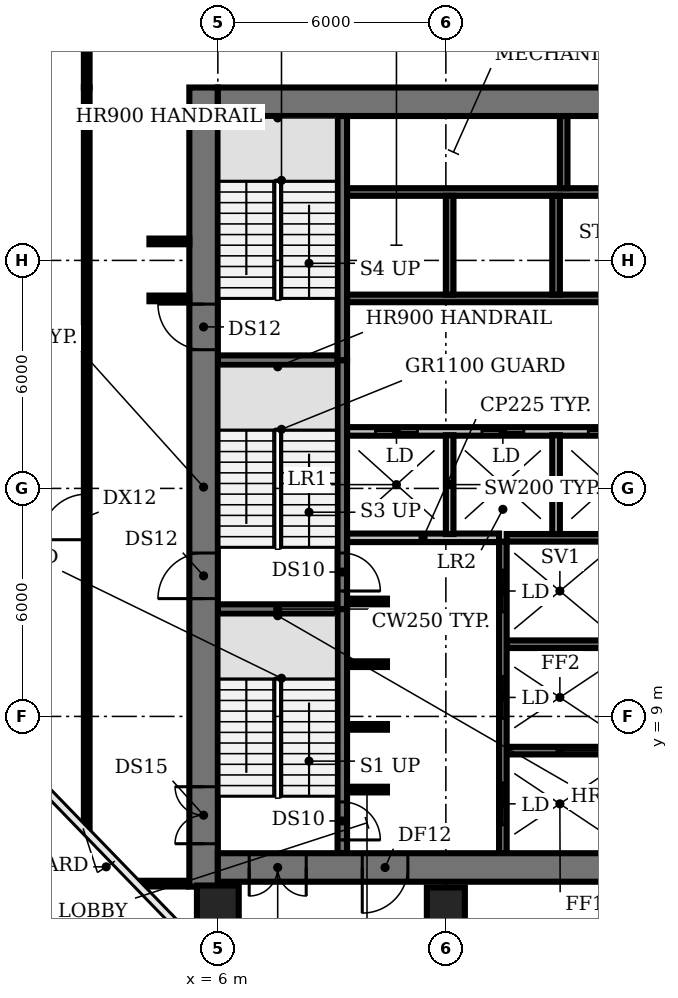
"""IFC4 building model, lengths in metres.
Left out: names, types, materials, properties, quantities, classifications, styles, units other than length and angle.
Written with IfcOpenShell. Run it as: python <this file> out.ifc"""

import sys

from ifc_helpers import new_model, si_unit, direction, frame, frame_2d, origin, origin_2d, place, context, subcontext, project, spatial, rectangle, circle, extrude, element, fill, save


model = new_model("IFC4")
c1 = context("Model", 3, precision=1e-05, world=origin(), true_north=direction((0.0, 1.0)))
c2 = subcontext(c1, "Body", "Model", "MODEL_VIEW")
j1 = project(units=[si_unit("LENGTHUNIT", "METRE"), si_unit("PLANEANGLEUNIT", "RADIAN")], contexts=[c1])
p1 = place(None, origin())
s1 = spatial("IfcSite", under=j1, at=p1, CompositionType="ELEMENT")
p2 = place(p1, origin())
s2 = spatial("IfcBuilding", under=s1, at=p2, CompositionType="ELEMENT")
p3 = place(p2, frame((0.0, 0.0, 134.0)))
s3 = spatial("IfcBuildingStorey", under=s2, at=p3, CompositionType="ELEMENT", Elevation=134.0)
p4 = place(p3, frame((6.0, 4.0, 0.0), z_axis=(0.0, 0.0, 1.0), x_axis=(1.0, 0.0, 0.0)))
e1 = element("IfcColumn", 1, at=p4, inside=s3, PredefinedType="COLUMN", context=c2, shape_type="SweptSolid", body=[
    extrude(circle(Radius=0.55, at=origin_2d()), origin(), (0.0, 0.0, 1.0), 3.2),
])
p5 = place(p3, frame((12.0, 4.0, 0.0), z_axis=(0.0, 0.0, 1.0), x_axis=(1.0, 0.0, 0.0)))
e2 = element("IfcColumn", 2, at=p5, inside=s3, PredefinedType="COLUMN", context=c2, shape_type="SweptSolid", body=[
    extrude(rectangle(XDim=1.0, YDim=1.0, at=origin_2d()), origin(), (0.0, 0.0, 1.0), 3.2),
])
p6 = place(p3, frame((9.4, 7.075, 0.0), z_axis=(0.0, 0.0, 1.0), x_axis=(1.0, 0.0, 0.0)))
e3 = element("IfcWall", 3, at=p6, inside=s3, PredefinedType="SHEAR", context=c2, shape_type="SweptSolid", body=[
    extrude(rectangle(XDim=1.05, YDim=0.15, at=frame_2d((0.525, 0.0))), origin(), (0.0, 0.0, 1.0), 3.8),
])
p7 = place(p3, frame((13.6, 8.1, 0.0), z_axis=(0.0, 0.0, 1.0), x_axis=(1.0, 0.0, 0.0)))
e4 = element("IfcWall", 4, at=p7, inside=s3, PredefinedType="SHEAR", context=c2, shape_type="SweptSolid", body=[
    extrude(rectangle(XDim=2.8, YDim=0.2, at=frame_2d((1.4, 0.0))), origin(), (0.0, 0.0, 1.0), 3.8),
])
for number, where, z_axis, x_axis in (
    (5, (9.4, 8.725, 0.0), (0.0, 0.0, 1.0), (1.0, 0.0, 0.0)),
    (6, (9.4, 10.375, 0.0), (0.0, 0.0, 1.0), (1.0, 0.0, 0.0)),
):
    element("IfcWall", number, at=place(p3, frame(where, z_axis=z_axis, x_axis=x_axis)), inside=s3, PredefinedType="SHEAR", context=c2, shape_type="SweptSolid", body=[
        extrude(rectangle(XDim=1.05, YDim=0.15, at=frame_2d((0.525, 0.0))), origin(), (0.0, 0.0, 1.0), 3.8),
    ])
p8 = place(p3, frame((13.6, 10.9, 0.0), z_axis=(0.0, 0.0, 1.0), x_axis=(1.0, 0.0, 0.0)))
e7 = element("IfcWall", 7, at=p8, inside=s3, PredefinedType="SHEAR", context=c2, shape_type="SweptSolid", body=[
    extrude(rectangle(XDim=2.8, YDim=0.2, at=frame_2d((1.4, 0.0))), origin(), (0.0, 0.0, 1.0), 3.8),
])
p9 = place(p3, frame((6.0, 11.825, 0.0), z_axis=(0.0, 0.0, 1.0), x_axis=(1.0, 0.0, 0.0)))
e8 = element("IfcWall", 8, at=p9, inside=s3, PredefinedType="SHEAR", context=c2, shape_type="SweptSolid", body=[
    extrude(rectangle(XDim=3.15, YDim=0.25, at=frame_2d((1.575, 0.0))), origin(), (0.0, 0.0, 1.0), 3.8),
])
p10 = place(p3, frame((9.4, 12.025, 0.0), z_axis=(0.0, 0.0, 1.0), x_axis=(1.0, 0.0, 0.0)))
e9 = element("IfcWall", 9, at=p10, inside=s3, PredefinedType="SHEAR", context=c2, shape_type="SweptSolid", body=[
    extrude(rectangle(XDim=1.05, YDim=0.15, at=frame_2d((0.525, 0.0))), origin(), (0.0, 0.0, 1.0), 3.8),
])
p11 = place(p3, frame((9.4, 13.7, 0.0), z_axis=(0.0, 0.0, 1.0), x_axis=(1.0, 0.0, 0.0)))
e10 = element("IfcWall", 10, at=p11, inside=s3, PredefinedType="PARTITIONING", context=c2, shape_type="SweptSolid", body=[
    extrude(rectangle(XDim=4.0, YDim=0.225, at=frame_2d((2.0, 0.0))), origin(), (0.0, 0.0, 1.0), 3.8),
])
p12 = place(p3, frame((13.6, 13.7, 0.0), z_axis=(0.0, 0.0, 1.0), x_axis=(1.0, 0.0, 0.0)))
e11 = element("IfcWall", 11, at=p12, inside=s3, PredefinedType="SHEAR", context=c2, shape_type="SweptSolid", body=[
    extrude(rectangle(XDim=2.8, YDim=0.2, at=frame_2d((1.4, 0.0))), origin(), (0.0, 0.0, 1.0), 3.8),
])
p13 = place(p3, frame((9.4, 16.5, 0.0), z_axis=(0.0, 0.0, 1.0), x_axis=(1.0, 0.0, 0.0)))
e12 = element("IfcWall", 12, at=p13, inside=s3, PredefinedType="PARTITIONING", context=c2, shape_type="SweptSolid", body=[
    extrude(rectangle(XDim=14.6, YDim=0.225, at=frame_2d((7.3, 0.0))), origin(), (0.0, 0.0, 1.0), 3.8),
])
p14 = place(p13, frame((0.75, 0.0, 0.0)))
e13 = element("IfcOpeningElement", 13, at=p14, cuts=e12, PredefinedType="OPENING", context=c2, shape_type="SweptSolid", body=[
    extrude(rectangle(XDim=1.1, YDim=2.1, at=frame_2d((0.55, 1.05))), frame((0.0, 0.123, 0.0), z_axis=(0.0, -1.0, 0.0), x_axis=(1.0, 0.0, 0.0)), (0.0, 0.0, 1.0), 0.245),
])
p15 = place(p13, frame((3.55, 0.0, 0.0)))
e14 = element("IfcOpeningElement", 14, at=p15, cuts=e12, PredefinedType="OPENING", context=c2, shape_type="SweptSolid", body=[
    extrude(rectangle(XDim=1.1, YDim=2.1, at=frame_2d((0.55, 1.05))), frame((0.0, 0.123, 0.0), z_axis=(0.0, -1.0, 0.0), x_axis=(1.0, 0.0, 0.0)), (0.0, 0.0, 1.0), 0.245),
])
p16 = place(p13, frame((6.35, 0.0, 0.0)))
e15 = element("IfcOpeningElement", 15, at=p16, cuts=e12, PredefinedType="OPENING", context=c2, shape_type="SweptSolid", body=[
    extrude(rectangle(XDim=1.1, YDim=2.1, at=frame_2d((0.55, 1.05))), frame((0.0, 0.123, 0.0), z_axis=(0.0, -1.0, 0.0), x_axis=(1.0, 0.0, 0.0)), (0.0, 0.0, 1.0), 0.245),
])
p17 = place(p13, frame((9.15, 0.0, 0.0)))
e16 = element("IfcOpeningElement", 16, at=p17, cuts=e12, PredefinedType="OPENING", context=c2, shape_type="SweptSolid", body=[
    extrude(rectangle(XDim=1.1, YDim=2.1, at=frame_2d((0.55, 1.05))), frame((0.0, 0.123, 0.0), z_axis=(0.0, -1.0, 0.0), x_axis=(1.0, 0.0, 0.0)), (0.0, 0.0, 1.0), 0.245),
])
p18 = place(p13, frame((12.4, 0.0, 0.0)))
e17 = element("IfcOpeningElement", 17, at=p18, cuts=e12, PredefinedType="OPENING", context=c2, shape_type="SweptSolid", body=[
    extrude(rectangle(XDim=1.0, YDim=2.1, at=frame_2d((0.5, 1.05))), frame((0.0, 0.123, 0.0), z_axis=(0.0, -1.0, 0.0), x_axis=(1.0, 0.0, 0.0)), (0.0, 0.0, 1.0), 0.245),
])
p19 = place(p3, frame((6.0, 18.375, 0.0), z_axis=(0.0, 0.0, 1.0), x_axis=(1.0, 0.0, 0.0)))
e18 = element("IfcWall", 18, at=p19, inside=s3, PredefinedType="SHEAR", context=c2, shape_type="SweptSolid", body=[
    extrude(rectangle(XDim=3.15, YDim=0.25, at=frame_2d((1.575, 0.0))), origin(), (0.0, 0.0, 1.0), 3.8),
])
for number, where, z_axis, x_axis in (
    (19, (9.4, 20.0, 0.0), (0.0, 0.0, 1.0), (1.0, 0.0, 0.0)),
    (20, (9.4, 22.8, 0.0), (0.0, 0.0, 1.0), (1.0, 0.0, 0.0)),
):
    element("IfcWall", number, at=place(p3, frame(where, z_axis=z_axis, x_axis=x_axis)), inside=s3, PredefinedType="SHEAR", context=c2, shape_type="SweptSolid", body=[
        extrude(rectangle(XDim=11.0, YDim=0.2, at=frame_2d((5.5, 0.0))), origin(), (0.0, 0.0, 1.0), 3.8),
    ])
p20 = place(p3, frame((9.275, 11.825, 0.0), z_axis=(0.0, 0.0, 1.0), x_axis=(0.0, -1.0, 0.0)))
e21 = element("IfcWall", 21, at=p20, inside=s3, PredefinedType="SHEAR", context=c2, shape_type="SweptSolid", body=[
    extrude(rectangle(XDim=6.425, YDim=0.25, at=frame_2d((3.212, 0.0))), origin(), (0.0, 0.0, 1.0), 3.8),
])
p21 = place(p20, frame((5.075, 0.0, 0.0)))
e22 = element("IfcOpeningElement", 22, at=p21, cuts=e21, PredefinedType="OPENING", context=c2, shape_type="SweptSolid", body=[
    extrude(rectangle(XDim=1.0, YDim=2.1, at=frame_2d((0.5, 1.05))), frame((0.0, 0.135, 0.0), z_axis=(0.0, -1.0, 0.0), x_axis=(1.0, 0.0, 0.0)), (0.0, 0.0, 1.0), 0.27),
])
p22 = place(p3, frame((9.275, 18.375, 0.0), z_axis=(0.0, 0.0, 1.0), x_axis=(0.0, -1.0, 0.0)))
e23 = element("IfcWall", 23, at=p22, inside=s3, PredefinedType="SHEAR", context=c2, shape_type="SweptSolid", body=[
    extrude(rectangle(XDim=6.55, YDim=0.25, at=frame_2d((3.275, 0.0))), origin(), (0.0, 0.0, 1.0), 3.8),
])
p23 = place(p22, frame((5.075, 0.0, 0.0)))
e24 = element("IfcOpeningElement", 24, at=p23, cuts=e23, PredefinedType="OPENING", context=c2, shape_type="SweptSolid", body=[
    extrude(rectangle(XDim=1.0, YDim=2.1, at=frame_2d((0.5, 1.05))), frame((0.0, 0.135, 0.0), z_axis=(0.0, -1.0, 0.0), x_axis=(1.0, 0.0, 0.0)), (0.0, 0.0, 1.0), 0.27),
])
p24 = place(p3, frame((9.275, 18.375, 0.0), z_axis=(0.0, 0.0, 1.0), x_axis=(0.0, 1.0, 0.0)))
e25 = element("IfcWall", 25, at=p24, inside=s3, PredefinedType="SHEAR", context=c2, shape_type="SweptSolid", body=[
    extrude(rectangle(XDim=6.425, YDim=0.25, at=frame_2d((3.212, 0.0))), origin(), (0.0, 0.0, 1.0), 3.8),
])
p25 = place(p3, frame((12.1, 13.8, 0.0), z_axis=(0.0, 0.0, 1.0), x_axis=(0.0, 1.0, 0.0)))
e26 = element("IfcWall", 26, at=p25, inside=s3, PredefinedType="SOLIDWALL", context=c2, shape_type="SweptSolid", body=[
    extrude(rectangle(XDim=2.6, YDim=0.2, at=frame_2d((1.3, 0.0))), origin(), (0.0, 0.0, 1.0), 3.8),
])
p26 = place(p3, frame((12.1, 20.1, 0.0), z_axis=(0.0, 0.0, 1.0), x_axis=(0.0, 1.0, 0.0)))
e27 = element("IfcWall", 27, at=p26, inside=s3, PredefinedType="SHEAR", context=c2, shape_type="SweptSolid", body=[
    extrude(rectangle(XDim=2.6, YDim=0.2, at=frame_2d((1.3, 0.0))), origin(), (0.0, 0.0, 1.0), 3.8),
])
p27 = place(p3, frame((13.5, 5.4, 0.0), z_axis=(0.0, 0.0, 1.0), x_axis=(0.0, 1.0, 0.0)))
e28 = element("IfcWall", 28, at=p27, inside=s3, PredefinedType="SHEAR", context=c2, shape_type="SweptSolid", body=[
    extrude(rectangle(XDim=8.2, YDim=0.2, at=frame_2d((4.1, 0.0))), origin(), (0.0, 0.0, 1.0), 3.8),
])
p28 = place(p27, frame((0.75, 0.0, 0.0)))
e29 = element("IfcOpeningElement", 29, at=p28, cuts=e28, PredefinedType="OPENING", context=c2, shape_type="SweptSolid", body=[
    extrude(rectangle(XDim=1.1, YDim=2.1, at=frame_2d((0.55, 1.05))), frame((0.0, 0.11, 0.0), z_axis=(0.0, -1.0, 0.0), x_axis=(1.0, 0.0, 0.0)), (0.0, 0.0, 1.0), 0.22),
])
p29 = place(p27, frame((3.55, 0.0, 0.0)))
e30 = element("IfcOpeningElement", 30, at=p29, cuts=e28, PredefinedType="OPENING", context=c2, shape_type="SweptSolid", body=[
    extrude(rectangle(XDim=1.1, YDim=2.1, at=frame_2d((0.55, 1.05))), frame((0.0, 0.11, 0.0), z_axis=(0.0, -1.0, 0.0), x_axis=(1.0, 0.0, 0.0)), (0.0, 0.0, 1.0), 0.22),
])
p30 = place(p27, frame((6.35, 0.0, 0.0)))
e31 = element("IfcOpeningElement", 31, at=p30, cuts=e28, PredefinedType="OPENING", context=c2, shape_type="SweptSolid", body=[
    extrude(rectangle(XDim=1.1, YDim=2.1, at=frame_2d((0.55, 1.05))), frame((0.0, 0.11, 0.0), z_axis=(0.0, -1.0, 0.0), x_axis=(1.0, 0.0, 0.0)), (0.0, 0.0, 1.0), 0.22),
])
p31 = place(p3, frame((14.9, 13.8, 0.0), z_axis=(0.0, 0.0, 1.0), x_axis=(0.0, 1.0, 0.0)))
e32 = element("IfcWall", 32, at=p31, inside=s3, PredefinedType="SOLIDWALL", context=c2, shape_type="SweptSolid", body=[
    extrude(rectangle(XDim=2.6, YDim=0.2, at=frame_2d((1.3, 0.0))), origin(), (0.0, 0.0, 1.0), 3.8),
])
p32 = place(p3, frame((14.9, 20.1, 0.0), z_axis=(0.0, 0.0, 1.0), x_axis=(0.0, 1.0, 0.0)))
e33 = element("IfcWall", 33, at=p32, inside=s3, PredefinedType="SHEAR", context=c2, shape_type="SweptSolid", body=[
    extrude(rectangle(XDim=2.6, YDim=0.2, at=frame_2d((1.3, 0.0))), origin(), (0.0, 0.0, 1.0), 3.8),
])
p33 = place(p3, frame((15.1, 22.9, 0.0), z_axis=(0.0, 0.0, 1.0), x_axis=(0.0, 1.0, 0.0)))
e34 = element("IfcWall", 34, at=p33, inside=s3, PredefinedType="SHEAR", context=c2, shape_type="SweptSolid", body=[
    extrude(rectangle(XDim=1.9, YDim=0.2, at=frame_2d((0.95, 0.0))), origin(), (0.0, 0.0, 1.0), 3.8),
])
p34 = place(p3, frame((5.625, 4.52, 0.0), z_axis=(0.0, 0.0, 1.0), x_axis=(0.0, 1.0, 0.0)))
e35 = element("IfcWall", 35, at=p34, inside=s3, PredefinedType="SHEAR", context=c2, shape_type="SweptSolid", body=[
    extrude(rectangle(XDim=21.03, YDim=0.75, at=frame_2d((10.515, 0.0))), origin(), (0.0, 0.0, 1.0), 3.8),
])
p35 = place(p34, frame((1.13, 0.0, 0.0)))
e36 = element("IfcOpeningElement", 36, at=p35, cuts=e35, PredefinedType="OPENING", context=c2, shape_type="SweptSolid", body=[
    extrude(rectangle(XDim=1.5, YDim=2.1, at=frame_2d((0.75, 1.05))), frame((0.0, 0.385, 0.0), z_axis=(0.0, -1.0, 0.0), x_axis=(1.0, 0.0, 0.0)), (0.0, 0.0, 1.0), 0.77),
])
p36 = place(p34, frame((7.58, 0.0, 0.0)))
e37 = element("IfcOpeningElement", 37, at=p36, cuts=e35, PredefinedType="OPENING", context=c2, shape_type="SweptSolid", body=[
    extrude(rectangle(XDim=1.2, YDim=2.1, at=frame_2d((0.6, 1.05))), frame((0.0, 0.385, 0.0), z_axis=(0.0, -1.0, 0.0), x_axis=(1.0, 0.0, 0.0)), (0.0, 0.0, 1.0), 0.77),
])
p37 = place(p34, frame((14.13, 0.0, 0.0)))
e38 = element("IfcOpeningElement", 38, at=p37, cuts=e35, PredefinedType="OPENING", context=c2, shape_type="SweptSolid", body=[
    extrude(rectangle(XDim=1.2, YDim=2.1, at=frame_2d((0.6, 1.05))), frame((0.0, 0.385, 0.0), z_axis=(0.0, -1.0, 0.0), x_axis=(1.0, 0.0, 0.0)), (0.0, 0.0, 1.0), 0.77),
])
p38 = place(p3, frame((24.0, 5.025, 0.0), z_axis=(0.0, 0.0, 1.0), x_axis=(-1.0, 0.0, 0.0)))
e39 = element("IfcWall", 39, at=p38, inside=s3, PredefinedType="SHEAR", context=c2, shape_type="SweptSolid", body=[
    extrude(rectangle(XDim=18.0, YDim=0.75, at=frame_2d((9.0, 0.0))), origin(), (0.0, 0.0, 1.0), 3.8),
])
p39 = place(p38, frame((0.825, 0.0, 0.0)))
e40 = element("IfcOpeningElement", 40, at=p39, cuts=e39, PredefinedType="OPENING", context=c2, shape_type="SweptSolid", body=[
    extrude(rectangle(XDim=1.5, YDim=2.1, at=frame_2d((0.75, 1.05))), frame((0.0, 0.385, 0.0), z_axis=(0.0, -1.0, 0.0), x_axis=(1.0, 0.0, 0.0)), (0.0, 0.0, 1.0), 0.77),
])
p40 = place(p38, frame((15.675, 0.0, 0.0)))
e41 = element("IfcOpeningElement", 41, at=p40, cuts=e39, PredefinedType="OPENING", context=c2, shape_type="SweptSolid", body=[
    extrude(rectangle(XDim=1.5, YDim=2.1, at=frame_2d((0.75, 1.05))), frame((0.0, 0.385, 0.0), z_axis=(0.0, -1.0, 0.0), x_axis=(1.0, 0.0, 0.0)), (0.0, 0.0, 1.0), 0.77),
])
p41 = place(p38, frame((13.0, 0.0, 0.0)))
e42 = element("IfcOpeningElement", 42, at=p41, cuts=e39, PredefinedType="OPENING", context=c2, shape_type="SweptSolid", body=[
    extrude(rectangle(XDim=1.2, YDim=2.1, at=frame_2d((0.6, 1.05))), frame((0.0, 0.385, 0.0), z_axis=(0.0, -1.0, 0.0), x_axis=(1.0, 0.0, 0.0)), (0.0, 0.0, 1.0), 0.77),
])
p42 = place(p38, frame((4.3, 0.0, 0.0)))
e43 = element("IfcOpeningElement", 43, at=p42, cuts=e39, PredefinedType="OPENING", context=c2, shape_type="SweptSolid", body=[
    extrude(rectangle(XDim=1.0, YDim=2.1, at=frame_2d((0.5, 1.05))), frame((0.0, 0.385, 0.0), z_axis=(0.0, -1.0, 0.0), x_axis=(1.0, 0.0, 0.0)), (0.0, 0.0, 1.0), 0.77),
])
p43 = place(p3, frame((6.0, 25.175, 0.0), z_axis=(0.0, 0.0, 1.0), x_axis=(1.0, 0.0, 0.0)))
e44 = element("IfcWall", 44, at=p43, inside=s3, PredefinedType="SHEAR", context=c2, shape_type="SweptSolid", body=[
    extrude(rectangle(XDim=18.0, YDim=0.75, at=frame_2d((9.0, 0.0))), origin(), (0.0, 0.0, 1.0), 3.8),
])
p44 = place(p3, frame((2.55, 6.03, 0.0), z_axis=(0.0, 0.0, 1.0), x_axis=(0.0, 1.0, 0.0)))
e45 = element("IfcWall", 45, at=p44, inside=s3, PredefinedType="PARTITIONING", context=c2, shape_type="SweptSolid", body=[
    extrude(rectangle(XDim=19.52, YDim=0.15, at=frame_2d((9.76, 0.0))), origin(), (0.0, 0.0, 1.0), 2.78),
])
p45 = place(p44, frame((7.62, 0.0, 0.0)))
e46 = element("IfcOpeningElement", 46, at=p45, cuts=e45, PredefinedType="OPENING", context=c2, shape_type="SweptSolid", body=[
    extrude(rectangle(XDim=1.2, YDim=2.1, at=frame_2d((0.6, 1.05))), frame((0.0, 0.085, 0.0), z_axis=(0.0, -1.0, 0.0), x_axis=(1.0, 0.0, 0.0)), (0.0, 0.0, 1.0), 0.17),
])
p46 = place(p3, frame((2.55, 25.55, 0.0), z_axis=(0.0, 0.0, 1.0), x_axis=(0.0, 1.0, 0.0)))
e47 = element("IfcWall", 47, at=p46, inside=s3, PredefinedType="PARTITIONING", context=c2, shape_type="SweptSolid", body=[
    extrude(rectangle(XDim=2.7, YDim=0.15, at=frame_2d((1.35, 0.0))), origin(), (0.0, 0.0, 1.0), 2.78),
])
p47 = place(p3, frame((3.94, 4.6, 0.0), z_axis=(0.0, 0.0, 1.0), x_axis=(1.0, 0.0, 0.0)))
e48 = element("IfcWall", 48, at=p47, inside=s3, PredefinedType="PARTITIONING", context=c2, shape_type="SweptSolid", body=[
    extrude(rectangle(XDim=1.21, YDim=0.15, at=frame_2d((0.605, 0.0))), origin(), (0.0, 0.0, 1.0), 2.78),
])
for number, where, z_axis, x_axis in (
    (49, (4.2, 20.0, 0.0), (0.0, 0.0, 1.0), (1.0, 0.0, 0.0)),
    (50, (4.2, 21.5, 0.0), (0.0, 0.0, 1.0), (1.0, 0.0, 0.0)),
):
    element("IfcWall", number, at=place(p3, frame(where, z_axis=z_axis, x_axis=x_axis)), inside=s3, PredefinedType="PARTITIONING", context=c2, shape_type="SweptSolid", body=[
        extrude(rectangle(XDim=1.05, YDim=0.15, at=frame_2d((0.525, 0.0))), origin(), (0.0, 0.0, 1.0), 2.78),
    ])
p48 = place(p14, origin())
e51 = element("IfcDoor", 51, at=p48, inside=s3, OperationType="DOUBLE_DOOR_SLIDING", PredefinedType="DOOR", context=c2, shape_type="SweptSolid", body=[
    extrude(rectangle(XDim=1.1, YDim=2.1, at=frame_2d((0.55, 1.05))), frame((0.0, 0.025, 0.0), z_axis=(0.0, -1.0, 0.0), x_axis=(1.0, 0.0, 0.0)), (0.0, 0.0, 1.0), 0.05),
])
fill(e13, e51)
p49 = place(p15, origin())
e52 = element("IfcDoor", 52, at=p49, inside=s3, OperationType="DOUBLE_DOOR_SLIDING", PredefinedType="DOOR", context=c2, shape_type="SweptSolid", body=[
    extrude(rectangle(XDim=1.1, YDim=2.1, at=frame_2d((0.55, 1.05))), frame((0.0, 0.025, 0.0), z_axis=(0.0, -1.0, 0.0), x_axis=(1.0, 0.0, 0.0)), (0.0, 0.0, 1.0), 0.05),
])
fill(e14, e52)
p50 = place(p16, origin())
e53 = element("IfcDoor", 53, at=p50, inside=s3, OperationType="DOUBLE_DOOR_SLIDING", PredefinedType="DOOR", context=c2, shape_type="SweptSolid", body=[
    extrude(rectangle(XDim=1.1, YDim=2.1, at=frame_2d((0.55, 1.05))), frame((0.0, 0.025, 0.0), z_axis=(0.0, -1.0, 0.0), x_axis=(1.0, 0.0, 0.0)), (0.0, 0.0, 1.0), 0.05),
])
fill(e15, e53)
p51 = place(p21, origin())
e54 = element("IfcDoor", 54, at=p51, inside=s3, OperationType="SINGLE_SWING_RIGHT", PredefinedType="DOOR", context=c2, shape_type="SweptSolid", body=[
    extrude(rectangle(XDim=1.0, YDim=2.1, at=frame_2d((0.5, 1.05))), frame((0.0, 0.025, 0.0), z_axis=(0.0, -1.0, 0.0), x_axis=(1.0, 0.0, 0.0)), (0.0, 0.0, 1.0), 0.05),
])
fill(e22, e54)
p52 = place(p23, origin())
e55 = element("IfcDoor", 55, at=p52, inside=s3, OperationType="SINGLE_SWING_RIGHT", PredefinedType="DOOR", context=c2, shape_type="SweptSolid", body=[
    extrude(rectangle(XDim=1.0, YDim=2.1, at=frame_2d((0.5, 1.05))), frame((0.0, 0.025, 0.0), z_axis=(0.0, -1.0, 0.0), x_axis=(1.0, 0.0, 0.0)), (0.0, 0.0, 1.0), 0.05),
])
fill(e24, e55)
p53 = place(p28, origin())
e56 = element("IfcDoor", 56, at=p53, inside=s3, OperationType="DOUBLE_DOOR_SLIDING", PredefinedType="DOOR", context=c2, shape_type="SweptSolid", body=[
    extrude(rectangle(XDim=1.1, YDim=2.1, at=frame_2d((0.55, 1.05))), frame((0.0, 0.025, 0.0), z_axis=(0.0, -1.0, 0.0), x_axis=(1.0, 0.0, 0.0)), (0.0, 0.0, 1.0), 0.05),
])
fill(e29, e56)
p54 = place(p29, origin())
e57 = element("IfcDoor", 57, at=p54, inside=s3, OperationType="DOUBLE_DOOR_SLIDING", PredefinedType="DOOR", context=c2, shape_type="SweptSolid", body=[
    extrude(rectangle(XDim=1.1, YDim=2.1, at=frame_2d((0.55, 1.05))), frame((0.0, 0.025, 0.0), z_axis=(0.0, -1.0, 0.0), x_axis=(1.0, 0.0, 0.0)), (0.0, 0.0, 1.0), 0.05),
])
fill(e30, e57)
p55 = place(p30, origin())
e58 = element("IfcDoor", 58, at=p55, inside=s3, OperationType="DOUBLE_DOOR_SLIDING", PredefinedType="DOOR", context=c2, shape_type="SweptSolid", body=[
    extrude(rectangle(XDim=1.1, YDim=2.1, at=frame_2d((0.55, 1.05))), frame((0.0, 0.025, 0.0), z_axis=(0.0, -1.0, 0.0), x_axis=(1.0, 0.0, 0.0)), (0.0, 0.0, 1.0), 0.05),
])
fill(e31, e58)
p56 = place(p35, origin())
e59 = element("IfcDoor", 59, at=p56, inside=s3, OperationType="DOUBLE_DOOR_SINGLE_SWING", PredefinedType="DOOR", context=c2, shape_type="SweptSolid", body=[
    extrude(rectangle(XDim=1.5, YDim=2.1, at=frame_2d((0.75, 1.05))), frame((0.0, 0.025, 0.0), z_axis=(0.0, -1.0, 0.0), x_axis=(1.0, 0.0, 0.0)), (0.0, 0.0, 1.0), 0.05),
])
fill(e36, e59)
p57 = place(p36, origin())
e60 = element("IfcDoor", 60, at=p57, inside=s3, OperationType="SINGLE_SWING_LEFT", PredefinedType="DOOR", context=c2, shape_type="SweptSolid", body=[
    extrude(rectangle(XDim=1.2, YDim=2.1, at=frame_2d((0.6, 1.05))), frame((0.0, 0.025, 0.0), z_axis=(0.0, -1.0, 0.0), x_axis=(1.0, 0.0, 0.0)), (0.0, 0.0, 1.0), 0.05),
])
fill(e37, e60)
p58 = place(p37, origin())
e61 = element("IfcDoor", 61, at=p58, inside=s3, OperationType="SINGLE_SWING_RIGHT", PredefinedType="DOOR", context=c2, shape_type="SweptSolid", body=[
    extrude(rectangle(XDim=1.2, YDim=2.1, at=frame_2d((0.6, 1.05))), frame((0.0, 0.025, 0.0), z_axis=(0.0, -1.0, 0.0), x_axis=(1.0, 0.0, 0.0)), (0.0, 0.0, 1.0), 0.05),
])
fill(e38, e61)
p59 = place(p40, origin())
e62 = element("IfcDoor", 62, at=p59, inside=s3, OperationType="DOUBLE_DOOR_SINGLE_SWING", PredefinedType="DOOR", context=c2, shape_type="SweptSolid", body=[
    extrude(rectangle(XDim=1.5, YDim=2.1, at=frame_2d((0.75, 1.05))), frame((0.0, 0.025, 0.0), z_axis=(0.0, -1.0, 0.0), x_axis=(1.0, 0.0, 0.0)), (0.0, 0.0, 1.0), 0.05),
])
fill(e41, e62)
p60 = place(p41, origin())
e63 = element("IfcDoor", 63, at=p60, inside=s3, OperationType="SINGLE_SWING_RIGHT", PredefinedType="DOOR", context=c2, shape_type="SweptSolid", body=[
    extrude(rectangle(XDim=1.2, YDim=2.1, at=frame_2d((0.6, 1.05))), frame((0.0, 0.025, 0.0), z_axis=(0.0, -1.0, 0.0), x_axis=(1.0, 0.0, 0.0)), (0.0, 0.0, 1.0), 0.05),
])
fill(e42, e63)
p61 = place(p45, origin())
e64 = element("IfcDoor", 64, at=p61, inside=s3, OperationType="SINGLE_SWING_LEFT", PredefinedType="DOOR", context=c2, shape_type="SweptSolid", body=[
    extrude(rectangle(XDim=1.2, YDim=2.1, at=frame_2d((0.6, 1.05))), frame((0.0, 0.025, 0.0), z_axis=(0.0, -1.0, 0.0), x_axis=(1.0, 0.0, 0.0)), (0.0, 0.0, 1.0), 0.05),
])
fill(e46, e64)
save(model, sys.argv[1])
